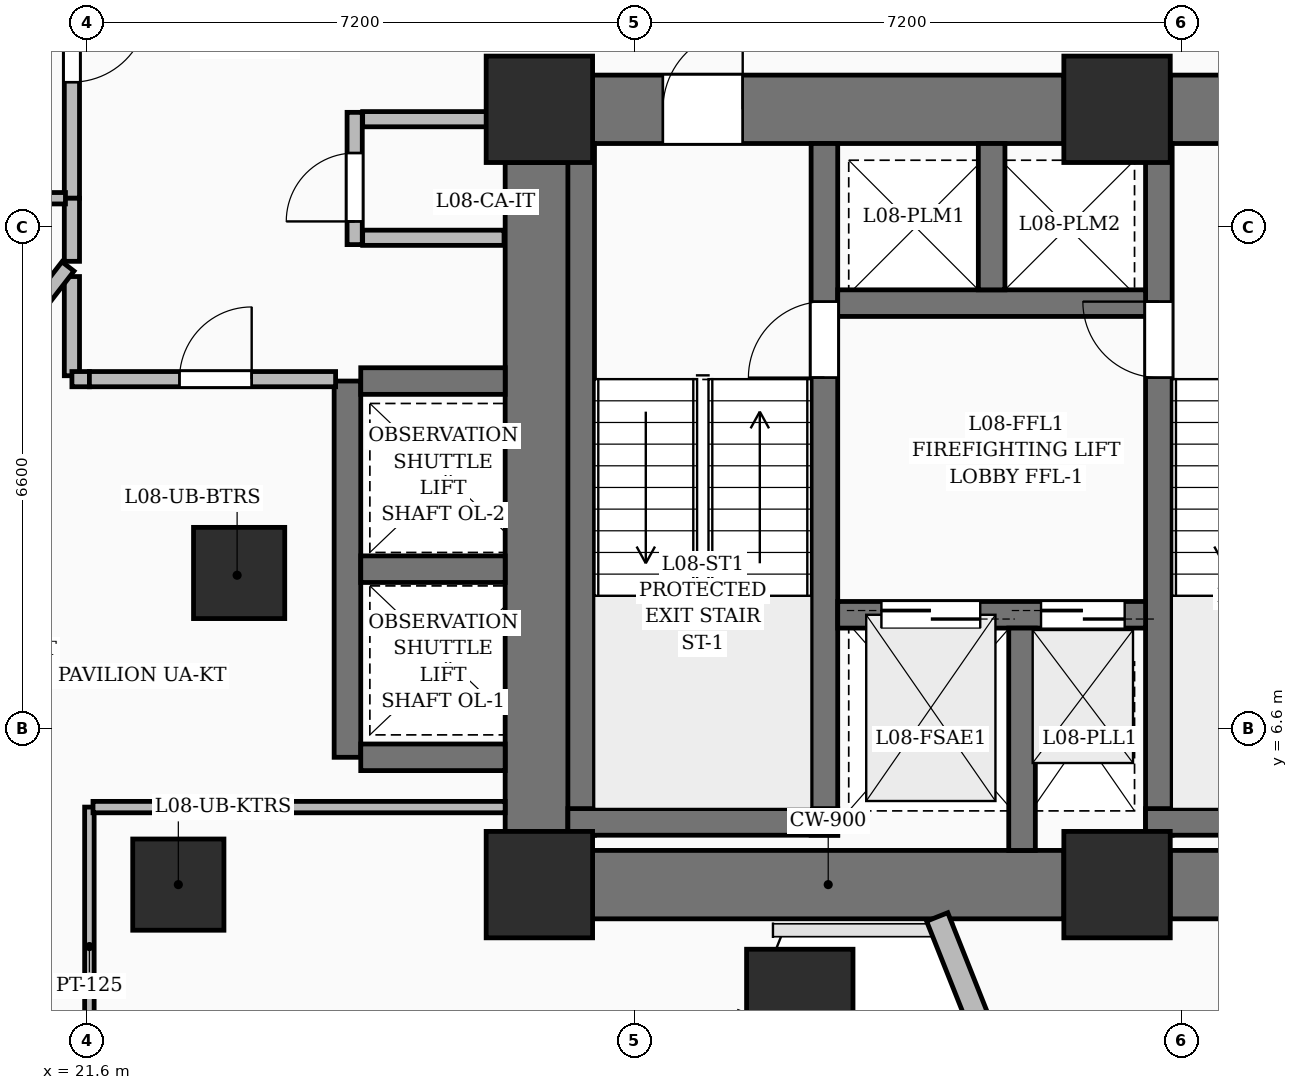
"""IFC4 building model, lengths in metres.
Left out: names, types, materials, properties, quantities, classifications, styles, units other than length and angle.
Written with IfcOpenShell. Run it as: python <this file> out.ifc"""

import sys

from ifc_helpers import new_model, si_unit, direction, frame, frame_2d, origin, origin_2d, place, context, subcontext, project, spatial, rectangle, extrude, element, fill, save


model = new_model("IFC4")
c1 = context("Model", 3, precision=1e-05, world=origin(), true_north=direction((0.0, 1.0)))
c2 = subcontext(c1, "Body", "Model", "MODEL_VIEW")
j1 = project(units=[si_unit("LENGTHUNIT", "METRE"), si_unit("PLANEANGLEUNIT", "RADIAN")], contexts=[c1])
p1 = place(None, origin())
s1 = spatial("IfcSite", under=j1, at=p1, CompositionType="ELEMENT")
p2 = place(p1, origin())
s2 = spatial("IfcBuilding", under=s1, at=p2, CompositionType="ELEMENT")
p3 = place(p2, frame((0.0, 0.0, 39.0)))
s3 = spatial("IfcBuildingStorey", under=s2, at=p3, CompositionType="ELEMENT", Elevation=39.0)
for number, where, z_axis, x_axis in (
    (1, (27.55, 4.55, 0.0), (0.0, 0.0, 1.0), (1.0, 0.0, 0.0)),
    (2, (35.15, 4.55, 0.0), (0.0, 0.0, 1.0), (1.0, 0.0, 0.0)),
    (3, (27.55, 14.75, 0.0), (0.0, 0.0, 1.0), (1.0, 0.0, 0.0)),
    (4, (35.15, 14.75, 0.0), (0.0, 0.0, 1.0), (1.0, 0.0, 0.0)),
):
    element("IfcColumn", number, at=place(p3, frame(where, z_axis=z_axis, x_axis=x_axis)), inside=s3, PredefinedType="COLUMN", context=c2, shape_type="SweptSolid", body=[
        extrude(rectangle(XDim=1.4, YDim=1.4, at=origin_2d()), origin(), (0.0, 0.0, 1.0), 3.6),
    ])
for number, where, z_axis, x_axis in (
    (5, (22.8, 4.55, 0.0), (0.0, 0.0, 1.0), (1.0, 0.0, 0.0)),
    (6, (23.6, 8.65, 0.0), (0.0, 0.0, 1.0), (1.0, 0.0, 0.0)),
):
    element("IfcColumn", number, at=place(p3, frame(where, z_axis=z_axis, x_axis=x_axis)), inside=s3, PredefinedType="COLUMN", context=c2, shape_type="SweptSolid", body=[
        extrude(rectangle(XDim=1.2, YDim=1.2, at=origin_2d()), origin(), (0.0, 0.0, 1.0), 3.6),
    ])
p4 = place(p3, frame((28.25, 4.55, 0.0), z_axis=(0.0, 0.0, 1.0), x_axis=(1.0, 0.0, 0.0)))
e7 = element("IfcWall", 7, at=p4, inside=s3, PredefinedType="SHEAR", context=c2, shape_type="SweptSolid", body=[
    extrude(rectangle(XDim=6.2, YDim=0.9, at=frame_2d((3.1, 0.0))), origin(), (0.0, 0.0, 1.0), 3.6),
])
p5 = place(p3, frame((35.85, 4.55, 0.0), z_axis=(0.0, 0.0, 1.0), x_axis=(1.0, 0.0, 0.0)))
e8 = element("IfcWall", 8, at=p5, inside=s3, PredefinedType="SHEAR", context=c2, shape_type="SweptSolid", body=[
    extrude(rectangle(XDim=10.5, YDim=0.9, at=frame_2d((5.25, 0.0))), origin(), (0.0, 0.0, 1.0), 3.6),
])
p6 = place(p3, frame((28.25, 14.75, 0.0), z_axis=(0.0, 0.0, 1.0), x_axis=(1.0, 0.0, 0.0)))
e9 = element("IfcWall", 9, at=p6, inside=s3, PredefinedType="SHEAR", context=c2, shape_type="SweptSolid", body=[
    extrude(rectangle(XDim=6.2, YDim=0.9, at=frame_2d((3.1, 0.0))), origin(), (0.0, 0.0, 1.0), 3.6),
])
p7 = place(p6, frame((0.925, 0.0, 0.0)))
e10 = element("IfcOpeningElement", 10, at=p7, cuts=e9, PredefinedType="OPENING", context=c2, shape_type="SweptSolid", body=[
    extrude(rectangle(XDim=1.05, YDim=2.15, at=frame_2d((0.525, 1.075))), frame((0.0, 0.46, 0.0), z_axis=(0.0, -1.0, 0.0), x_axis=(1.0, 0.0, 0.0)), (0.0, 0.0, 1.0), 0.92),
])
p8 = place(p3, frame((35.85, 14.75, 0.0), z_axis=(0.0, 0.0, 1.0), x_axis=(1.0, 0.0, 0.0)))
e11 = element("IfcWall", 11, at=p8, inside=s3, PredefinedType="SHEAR", context=c2, shape_type="SweptSolid", body=[
    extrude(rectangle(XDim=10.5, YDim=0.9, at=frame_2d((5.25, 0.0))), origin(), (0.0, 0.0, 1.0), 3.6),
])
p9 = place(p8, frame((0.925, 0.0, 0.0)))
e12 = element("IfcOpeningElement", 12, at=p9, cuts=e11, PredefinedType="OPENING", context=c2, shape_type="SweptSolid", body=[
    extrude(rectangle(XDim=1.05, YDim=2.15, at=frame_2d((0.525, 1.075))), frame((0.0, 0.46, 0.0), z_axis=(0.0, -1.0, 0.0), x_axis=(1.0, 0.0, 0.0)), (0.0, 0.0, 1.0), 0.92),
])
p10 = place(p8, frame((8.525, 0.0, 0.0)))
e13 = element("IfcOpeningElement", 13, at=p10, cuts=e11, PredefinedType="OPENING", context=c2, shape_type="SweptSolid", body=[
    extrude(rectangle(XDim=1.05, YDim=2.15, at=frame_2d((0.525, 1.075))), frame((0.0, 0.46, 0.0), z_axis=(0.0, -1.0, 0.0), x_axis=(1.0, 0.0, 0.0)), (0.0, 0.0, 1.0), 0.92),
])
p11 = place(p3, frame((27.55, 5.25, 0.0), z_axis=(0.0, 0.0, 1.0), x_axis=(0.0, 1.0, 0.0)))
e14 = element("IfcWall", 14, at=p11, inside=s3, PredefinedType="SHEAR", context=c2, shape_type="SweptSolid", body=[
    extrude(rectangle(XDim=8.8, YDim=0.9, at=frame_2d((4.4, 0.0))), origin(), (0.0, 0.0, 1.0), 3.6),
])
p12 = place(p3, frame((28.1, 5.2, 0.0), z_axis=(0.0, 0.0, 1.0), x_axis=(0.0, 1.0, 0.0)))
e15 = element("IfcWall", 15, at=p12, inside=s3, PredefinedType="SOLIDWALL", context=c2, shape_type="SweptSolid", body=[
    extrude(rectangle(XDim=9.1, YDim=0.35, at=frame_2d((4.55, 0.0))), origin(), (0.0, 0.0, 1.0), 3.6),
])
p13 = place(p3, frame((31.3, 5.2, 0.0), z_axis=(0.0, 0.0, 1.0), x_axis=(0.0, 1.0, 0.0)))
e16 = element("IfcWall", 16, at=p13, inside=s3, PredefinedType="SOLIDWALL", context=c2, shape_type="SweptSolid", body=[
    extrude(rectangle(XDim=9.1, YDim=0.35, at=frame_2d((4.55, 0.0))), origin(), (0.0, 0.0, 1.0), 3.6),
])
p14 = place(p13, frame((6.02, 0.0, 0.0)))
e17 = element("IfcOpeningElement", 17, at=p14, cuts=e16, PredefinedType="OPENING", context=c2, shape_type="SweptSolid", body=[
    extrude(rectangle(XDim=1.0, YDim=2.15, at=frame_2d((0.5, 1.075))), frame((0.0, 0.185, 0.0), z_axis=(0.0, -1.0, 0.0), x_axis=(1.0, 0.0, 0.0)), (0.0, 0.0, 1.0), 0.37),
])
p15 = place(p3, frame((27.925, 5.375, 0.0), z_axis=(0.0, 0.0, 1.0), x_axis=(1.0, 0.0, 0.0)))
e18 = element("IfcWall", 18, at=p15, inside=s3, PredefinedType="SOLIDWALL", context=c2, shape_type="SweptSolid", body=[
    extrude(rectangle(XDim=3.55, YDim=0.35, at=frame_2d((1.775, 0.0))), origin(), (0.0, 0.0, 1.0), 3.6),
])
p16 = place(p3, frame((35.7, 5.2, 0.0), z_axis=(0.0, 0.0, 1.0), x_axis=(0.0, 1.0, 0.0)))
e19 = element("IfcWall", 19, at=p16, inside=s3, PredefinedType="SOLIDWALL", context=c2, shape_type="SweptSolid", body=[
    extrude(rectangle(XDim=9.1, YDim=0.35, at=frame_2d((4.55, 0.0))), origin(), (0.0, 0.0, 1.0), 3.6),
])
p17 = place(p16, frame((6.02, 0.0, 0.0)))
e20 = element("IfcOpeningElement", 20, at=p17, cuts=e19, PredefinedType="OPENING", context=c2, shape_type="SweptSolid", body=[
    extrude(rectangle(XDim=1.0, YDim=2.15, at=frame_2d((0.5, 1.075))), frame((0.0, 0.185, 0.0), z_axis=(0.0, -1.0, 0.0), x_axis=(1.0, 0.0, 0.0)), (0.0, 0.0, 1.0), 0.37),
])
p18 = place(p3, frame((35.525, 5.375, 0.0), z_axis=(0.0, 0.0, 1.0), x_axis=(1.0, 0.0, 0.0)))
e21 = element("IfcWall", 21, at=p18, inside=s3, PredefinedType="SOLIDWALL", context=c2, shape_type="SweptSolid", body=[
    extrude(rectangle(XDim=3.55, YDim=0.35, at=frame_2d((1.775, 0.0))), origin(), (0.0, 0.0, 1.0), 3.6),
])
p19 = place(p3, frame((31.475, 8.1, 0.0), z_axis=(0.0, 0.0, 1.0), x_axis=(1.0, 0.0, 0.0)))
e22 = element("IfcWall", 22, at=p19, inside=s3, PredefinedType="SOLIDWALL", context=c2, shape_type="SweptSolid", body=[
    extrude(rectangle(XDim=4.05, YDim=0.35, at=frame_2d((2.025, 0.0))), origin(), (0.0, 0.0, 1.0), 3.6),
])
p20 = place(p19, frame((0.575, 0.0, 0.0)))
e23 = element("IfcOpeningElement", 23, at=p20, cuts=e22, PredefinedType="OPENING", context=c2, shape_type="SweptSolid", body=[
    extrude(rectangle(XDim=1.3, YDim=2.25, at=frame_2d((0.65, 1.125))), frame((0.0, 0.185, 0.0), z_axis=(0.0, -1.0, 0.0), x_axis=(1.0, 0.0, 0.0)), (0.0, 0.0, 1.0), 0.37),
])
p21 = place(p19, frame((2.675, 0.0, 0.0)))
e24 = element("IfcOpeningElement", 24, at=p21, cuts=e22, PredefinedType="OPENING", context=c2, shape_type="SweptSolid", body=[
    extrude(rectangle(XDim=1.1, YDim=2.2, at=frame_2d((0.55, 1.1))), frame((0.0, 0.185, 0.0), z_axis=(0.0, -1.0, 0.0), x_axis=(1.0, 0.0, 0.0)), (0.0, 0.0, 1.0), 0.37),
])
p22 = place(p3, frame((33.9, 5.0, 0.0), z_axis=(0.0, 0.0, 1.0), x_axis=(0.0, 1.0, 0.0)))
e25 = element("IfcWall", 25, at=p22, inside=s3, PredefinedType="SOLIDWALL", context=c2, shape_type="SweptSolid", body=[
    extrude(rectangle(XDim=2.925, YDim=0.35, at=frame_2d((1.462, 0.0))), origin(), (0.0, 0.0, 1.0), 3.6),
])
p23 = place(p3, frame((31.475, 12.2, 0.0), z_axis=(0.0, 0.0, 1.0), x_axis=(1.0, 0.0, 0.0)))
e26 = element("IfcWall", 26, at=p23, inside=s3, PredefinedType="SOLIDWALL", context=c2, shape_type="SweptSolid", body=[
    extrude(rectangle(XDim=4.05, YDim=0.35, at=frame_2d((2.025, 0.0))), origin(), (0.0, 0.0, 1.0), 3.6),
])
p24 = place(p3, frame((33.5, 12.375, 0.0), z_axis=(0.0, 0.0, 1.0), x_axis=(0.0, 1.0, 0.0)))
e27 = element("IfcWall", 27, at=p24, inside=s3, PredefinedType="SOLIDWALL", context=c2, shape_type="SweptSolid", body=[
    extrude(rectangle(XDim=1.925, YDim=0.35, at=frame_2d((0.962, 0.0))), origin(), (0.0, 0.0, 1.0), 3.6),
])
p25 = place(p3, frame((25.025, 6.225, 0.0), z_axis=(0.0, 0.0, 1.0), x_axis=(0.0, 1.0, 0.0)))
e28 = element("IfcWall", 28, at=p25, inside=s3, PredefinedType="SOLIDWALL", context=c2, shape_type="SweptSolid", body=[
    extrude(rectangle(XDim=4.95, YDim=0.35, at=frame_2d((2.475, 0.0))), origin(), (0.0, 0.0, 1.0), 3.6),
])
for number, where, z_axis, x_axis in (
    (29, (25.2, 6.225, 0.0), (0.0, 0.0, 1.0), (1.0, 0.0, 0.0)),
    (30, (25.2, 8.7, 0.0), (0.0, 0.0, 1.0), (1.0, 0.0, 0.0)),
    (31, (25.2, 11.175, 0.0), (0.0, 0.0, 1.0), (1.0, 0.0, 0.0)),
):
    element("IfcWall", number, at=place(p3, frame(where, z_axis=z_axis, x_axis=x_axis)), inside=s3, PredefinedType="SOLIDWALL", context=c2, shape_type="SweptSolid", body=[
        extrude(rectangle(XDim=1.9, YDim=0.35, at=frame_2d((0.95, 0.0))), origin(), (0.0, 0.0, 1.0), 3.6),
    ])
p26 = place(p3, frame((30.976, 3.0, 0.0), z_axis=(0.0, 0.0, 1.0), x_axis=(1.0, 0.0, 0.0)))
e32 = element("IfcColumn", 32, at=p26, inside=s3, PredefinedType="COLUMN", context=c2, shape_type="SweptSolid", body=[
    extrude(rectangle(XDim=1.4, YDim=1.4, at=origin_2d()), origin(), (0.0, 0.0, 1.0), 3.6),
])
p27 = place(p3, frame((33.658, 1.925, 0.0), z_axis=(0.0, 0.0, 1.0), x_axis=(-0.36946923074, 0.92924296475, 0.0)))
e33 = element("IfcWall", 33, at=p27, inside=s3, PredefinedType="SOLIDWALL", context=c2, shape_type="SweptSolid", body=[
    extrude(rectangle(XDim=2.367, YDim=0.3, at=frame_2d((1.184, 0.0))), origin(), (0.0, 0.0, 1.0), 2.3),
])
p28 = place(p3, frame((25.12, 12.97, 0.0), z_axis=(0.0, 0.0, 1.0), x_axis=(0.0, 1.0, 0.0)))
e34 = element("IfcWall", 34, at=p28, inside=s3, PredefinedType="PARTITIONING", context=c2, shape_type="SweptSolid", body=[
    extrude(rectangle(XDim=1.74, YDim=0.2, at=frame_2d((0.87, 0.0))), origin(), (0.0, 0.0, 1.0), 3.35),
])
p29 = place(p28, frame((0.305, 0.0, 0.0)))
e35 = element("IfcOpeningElement", 35, at=p29, cuts=e34, PredefinedType="OPENING", context=c2, shape_type="SweptSolid", body=[
    extrude(rectangle(XDim=0.9, YDim=2.1, at=frame_2d((0.45, 1.05))), frame((0.0, 0.11, 0.0), z_axis=(0.0, -1.0, 0.0), x_axis=(1.0, 0.0, 0.0)), (0.0, 0.0, 1.0), 0.22),
])
for number, where, z_axis, x_axis in (
    (36, (25.225, 14.62, 0.0), (0.0, 0.0, 1.0), (1.0, 0.0, 0.0)),
    (37, (25.225, 13.06, 0.0), (0.0, 0.0, 1.0), (1.0, 0.0, 0.0)),
):
    element("IfcWall", number, at=place(p3, frame(where, z_axis=z_axis, x_axis=x_axis)), inside=s3, PredefinedType="PARTITIONING", context=c2, shape_type="SweptSolid", body=[
        extrude(rectangle(XDim=1.86, YDim=0.2, at=frame_2d((0.93, 0.0))), origin(), (0.0, 0.0, 1.0), 3.35),
    ])
p30 = place(p3, frame((21.4, 12.55, 0.0), z_axis=(0.0, 0.0, 1.0), x_axis=(0.0, -1.0, 0.0)))
e38 = element("IfcWall", 38, at=p30, inside=s3, PredefinedType="PARTITIONING", context=c2, shape_type="SweptSolid", body=[
    extrude(rectangle(XDim=1.305, YDim=0.2, at=frame_2d((0.652, 0.0))), origin(), (0.0, 0.0, 1.0), 3.35),
])
p31 = place(p3, frame((21.4, 11.2, 0.0), z_axis=(0.0, 0.0, 1.0), x_axis=(1.0, 0.0, 0.0)))
e39 = element("IfcWall", 39, at=p31, inside=s3, PredefinedType="PARTITIONING", context=c2, shape_type="SweptSolid", body=[
    extrude(rectangle(XDim=0.23, YDim=0.2, at=frame_2d((0.115, 0.0))), origin(), (0.0, 0.0, 1.0), 2.771),
])
p32 = place(p3, frame((21.63, 11.2, 0.0), z_axis=(0.0, 0.0, 1.0), x_axis=(1.0, 0.0, 0.0)))
e40 = element("IfcWall", 40, at=p32, inside=s3, PredefinedType="PARTITIONING", context=c2, shape_type="SweptSolid", body=[
    extrude(rectangle(XDim=3.239, YDim=0.2, at=frame_2d((1.62, 0.0))), origin(), (0.0, 0.0, 1.0), 2.771),
])
p33 = place(p32, frame((1.185, 0.0, 0.0)))
e41 = element("IfcOpeningElement", 41, at=p33, cuts=e40, PredefinedType="OPENING", context=c2, shape_type="SweptSolid", body=[
    extrude(rectangle(XDim=0.95, YDim=2.2, at=frame_2d((0.475, 1.1))), frame((0.0, 0.11, 0.0), z_axis=(0.0, -1.0, 0.0), x_axis=(1.0, 0.0, 0.0)), (0.0, 0.0, 1.0), 0.22),
])
p34 = place(p3, frame((21.4, 17.75, 0.0), z_axis=(0.0, 0.0, 1.0), x_axis=(0.0, -1.0, 0.0)))
e42 = element("IfcWall", 42, at=p34, inside=s3, PredefinedType="PARTITIONING", context=c2, shape_type="SweptSolid", body=[
    extrude(rectangle(XDim=4.17, YDim=0.2, at=frame_2d((2.085, 0.0))), origin(), (0.0, 0.0, 1.0), 2.771),
])
p35 = place(p34, frame((1.643, 0.0, 0.0)))
e43 = element("IfcOpeningElement", 43, at=p35, cuts=e42, PredefinedType="OPENING", context=c2, shape_type="SweptSolid", body=[
    extrude(rectangle(XDim=1.0, YDim=2.2, at=frame_2d((0.5, 1.1))), frame((0.0, 0.11, 0.0), z_axis=(0.0, -1.0, 0.0), x_axis=(1.0, 0.0, 0.0)), (0.0, 0.0, 1.0), 0.22),
])
p36 = place(p3, frame((21.4, 13.58, 0.0), z_axis=(0.0, 0.0, 1.0), x_axis=(0.0, -1.0, 0.0)))
e44 = element("IfcWall", 44, at=p36, inside=s3, PredefinedType="PARTITIONING", context=c2, shape_type="SweptSolid", body=[
    extrude(rectangle(XDim=0.83, YDim=0.2, at=frame_2d((0.415, 0.0))), origin(), (0.0, 0.0, 1.0), 3.35),
])
p37 = place(p3, frame((21.63, 1.9, 0.0), z_axis=(0.0, 0.0, 1.0), x_axis=(0.0, 1.0, 0.0)))
e45 = element("IfcWall", 45, at=p37, inside=s3, PredefinedType="PARTITIONING", context=c2, shape_type="SweptSolid", body=[
    extrude(rectangle(XDim=3.67, YDim=0.125, at=frame_2d((1.835, 0.0))), origin(), (0.0, 0.0, 1.0), 2.279),
])
p38 = place(p3, frame((21.348, 12.683, 0.0), z_axis=(0.0, 0.0, 1.0), x_axis=(-0.611075844668, -0.791572051088, 0.0)))
e46 = element("IfcWall", 46, at=p38, inside=s3, PredefinedType="PARTITIONING", context=c2, shape_type="SweptSolid", body=[
    extrude(rectangle(XDim=3.515, YDim=0.2, at=frame_2d((1.758, 0.0))), origin(), (0.0, 0.0, 1.0), 2.279),
])
p39 = place(p3, frame((21.677, 5.57, 0.0), z_axis=(0.0, 0.0, 1.0), x_axis=(1.0, 0.0, 0.0)))
e47 = element("IfcWall", 47, at=p39, inside=s3, PredefinedType="PARTITIONING", context=c2, shape_type="SweptSolid", body=[
    extrude(rectangle(XDim=0.903, YDim=0.15, at=frame_2d((0.451, 0.0))), origin(), (0.0, 0.0, 1.0), 3.35),
])
p40 = place(p3, frame((23.02, 5.57, 0.0), z_axis=(0.0, 0.0, 1.0), x_axis=(1.0, 0.0, 0.0)))
e48 = element("IfcWall", 48, at=p40, inside=s3, PredefinedType="PARTITIONING", context=c2, shape_type="SweptSolid", body=[
    extrude(rectangle(XDim=4.08, YDim=0.15, at=frame_2d((2.04, 0.0))), origin(), (0.0, 0.0, 1.0), 3.35),
])
p41 = place(p3, frame((16.64, 13.58, 0.0), z_axis=(0.0, 0.0, 1.0), x_axis=(1.0, 0.0, 0.0)))
e49 = element("IfcWall", 49, at=p41, inside=s3, PredefinedType="PARTITIONING", context=c2, shape_type="SweptSolid", body=[
    extrude(rectangle(XDim=4.675, YDim=0.15, at=frame_2d((2.337, 0.0))), origin(), (0.0, 0.0, 1.0), 2.771),
])
p42 = place(p41, frame((1.896, 0.0, 0.0)))
e50 = element("IfcOpeningElement", 50, at=p42, cuts=e49, PredefinedType="OPENING", context=c2, shape_type="SweptSolid", body=[
    extrude(rectangle(XDim=0.85, YDim=2.1, at=frame_2d((0.425, 1.05))), frame((0.0, 0.085, 0.0), z_axis=(0.0, -1.0, 0.0), x_axis=(1.0, 0.0, 0.0)), (0.0, 0.0, 1.0), 0.17),
])
p43 = place(p7, origin())
e51 = element("IfcDoor", 51, at=p43, inside=s3, OperationType="SINGLE_SWING_RIGHT", PredefinedType="DOOR", context=c2, shape_type="SweptSolid", body=[
    extrude(rectangle(XDim=1.05, YDim=2.15, at=frame_2d((0.525, 1.075))), frame((0.0, 0.025, 0.0), z_axis=(0.0, -1.0, 0.0), x_axis=(1.0, 0.0, 0.0)), (0.0, 0.0, 1.0), 0.05),
])
fill(e10, e51)
p44 = place(p14, origin())
e52 = element("IfcDoor", 52, at=p44, inside=s3, OperationType="SINGLE_SWING_LEFT", PredefinedType="DOOR", context=c2, shape_type="SweptSolid", body=[
    extrude(rectangle(XDim=1.0, YDim=2.15, at=frame_2d((0.5, 1.075))), frame((0.0, 0.025, 0.0), z_axis=(0.0, -1.0, 0.0), x_axis=(1.0, 0.0, 0.0)), (0.0, 0.0, 1.0), 0.05),
])
fill(e17, e52)
p45 = place(p17, origin())
e53 = element("IfcDoor", 53, at=p45, inside=s3, OperationType="SINGLE_SWING_RIGHT", PredefinedType="DOOR", context=c2, shape_type="SweptSolid", body=[
    extrude(rectangle(XDim=1.0, YDim=2.15, at=frame_2d((0.5, 1.075))), frame((0.0, 0.025, 0.0), z_axis=(0.0, -1.0, 0.0), x_axis=(1.0, 0.0, 0.0)), (0.0, 0.0, 1.0), 0.05),
])
fill(e20, e53)
p46 = place(p20, origin())
e54 = element("IfcDoor", 54, at=p46, inside=s3, OperationType="DOUBLE_DOOR_SLIDING", PredefinedType="DOOR", context=c2, shape_type="SweptSolid", body=[
    extrude(rectangle(XDim=1.3, YDim=2.25, at=frame_2d((0.65, 1.125))), frame((0.0, 0.025, 0.0), z_axis=(0.0, -1.0, 0.0), x_axis=(1.0, 0.0, 0.0)), (0.0, 0.0, 1.0), 0.05),
])
fill(e23, e54)
p47 = place(p21, origin())
e55 = element("IfcDoor", 55, at=p47, inside=s3, OperationType="DOUBLE_DOOR_SLIDING", PredefinedType="DOOR", context=c2, shape_type="SweptSolid", body=[
    extrude(rectangle(XDim=1.1, YDim=2.2, at=frame_2d((0.55, 1.1))), frame((0.0, 0.025, 0.0), z_axis=(0.0, -1.0, 0.0), x_axis=(1.0, 0.0, 0.0)), (0.0, 0.0, 1.0), 0.05),
])
fill(e24, e55)
p48 = place(p29, origin())
e56 = element("IfcDoor", 56, at=p48, inside=s3, OperationType="SINGLE_SWING_LEFT", PredefinedType="DOOR", context=c2, shape_type="SweptSolid", body=[
    extrude(rectangle(XDim=0.9, YDim=2.1, at=frame_2d((0.45, 1.05))), frame((0.0, 0.025, 0.0), z_axis=(0.0, -1.0, 0.0), x_axis=(1.0, 0.0, 0.0)), (0.0, 0.0, 1.0), 0.05),
])
fill(e35, e56)
p49 = place(p35, origin())
e57 = element("IfcDoor", 57, at=p49, inside=s3, OperationType="SINGLE_SWING_LEFT", PredefinedType="DOOR", context=c2, shape_type="SweptSolid", body=[
    extrude(rectangle(XDim=1.0, YDim=2.2, at=frame_2d((0.5, 1.1))), frame((0.0, 0.025, 0.0), z_axis=(0.0, -1.0, 0.0), x_axis=(1.0, 0.0, 0.0)), (0.0, 0.0, 1.0), 0.05),
])
fill(e43, e57)
p50 = place(p33, origin())
e58 = element("IfcDoor", 58, at=p50, inside=s3, OperationType="SINGLE_SWING_RIGHT", PredefinedType="DOOR", context=c2, shape_type="SweptSolid", body=[
    extrude(rectangle(XDim=0.95, YDim=2.2, at=frame_2d((0.475, 1.1))), frame((0.0, 0.025, 0.0), z_axis=(0.0, -1.0, 0.0), x_axis=(1.0, 0.0, 0.0)), (0.0, 0.0, 1.0), 0.05),
])
fill(e41, e58)
save(model, sys.argv[1])
